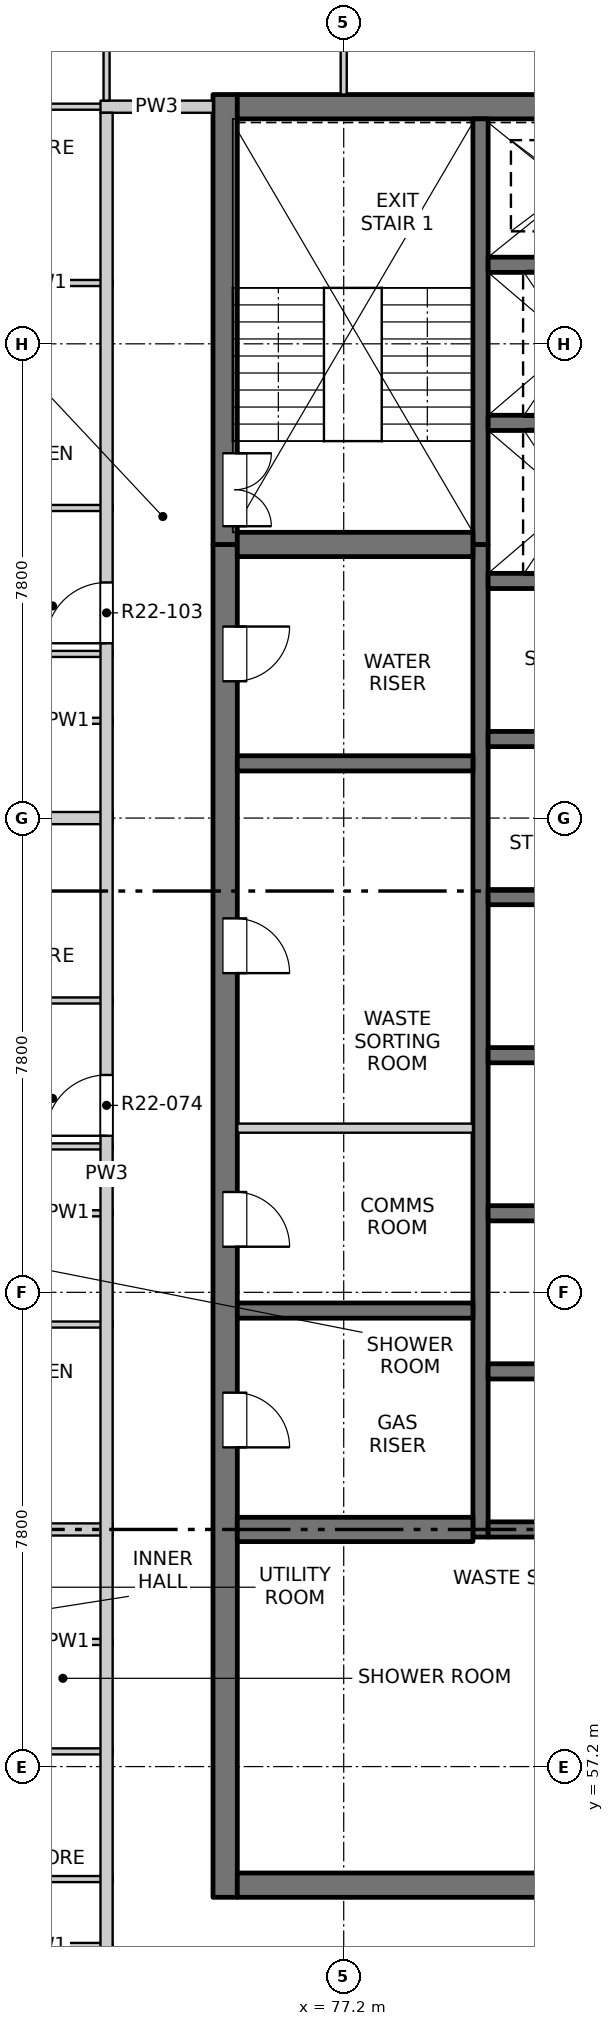
"""IFC4 building model, lengths in metres.
Left out: names, types, materials, properties, quantities, classifications, styles, units other than length and angle.
Written with IfcOpenShell. Run it as: python <this file> out.ifc"""

import sys

from ifc_helpers import new_model, si_unit, direction, frame, frame_2d, origin, place, context, subcontext, project, spatial, rectangle, extrude, element, fill, save


model = new_model("IFC4")
c1 = context("Model", 3, precision=1e-05, world=origin(), true_north=direction((0.0, 1.0)))
c2 = subcontext(c1, "Body", "Model", "MODEL_VIEW")
j1 = project(units=[si_unit("LENGTHUNIT", "METRE"), si_unit("PLANEANGLEUNIT", "RADIAN")], contexts=[c1])
p1 = place(None, origin())
s1 = spatial("IfcSite", under=j1, at=p1, CompositionType="ELEMENT")
p2 = place(p1, origin())
s2 = spatial("IfcBuilding", under=s1, at=p2, CompositionType="ELEMENT")
p3 = place(p2, frame((0.0, 0.0, 231.3)))
s3 = spatial("IfcBuildingStorey", under=s2, at=p3, CompositionType="ELEMENT", Elevation=231.3)
p4 = place(p3, frame((75.25, 55.05, -0.25), z_axis=(0.0, 0.0, 1.0), x_axis=(0.0, 1.0, 0.0)))
e1 = element("IfcWall", 1, at=p4, inside=s3, PredefinedType="SOLIDWALL", context=c2, shape_type="SweptSolid", body=[
    extrude(rectangle(XDim=22.25, YDim=0.4, at=frame_2d((11.125, 0.0))), origin(), (0.0, 0.0, 1.0), 3.4),
])
p5 = place(p4, frame((7.4, 0.0, 0.25)))
e2 = element("IfcOpeningElement", 2, at=p5, cuts=e1, PredefinedType="OPENING", context=c2, shape_type="SweptSolid", body=[
    extrude(rectangle(XDim=0.9, YDim=2.1, at=frame_2d((0.45, 1.05))), frame((0.0, 0.21, 0.0), z_axis=(0.0, -1.0, 0.0), x_axis=(1.0, 0.0, 0.0)), (0.0, 0.0, 1.0), 0.42),
])
p6 = place(p4, frame((10.7, 0.0, 0.25)))
e3 = element("IfcOpeningElement", 3, at=p6, cuts=e1, PredefinedType="OPENING", context=c2, shape_type="SweptSolid", body=[
    extrude(rectangle(XDim=0.9, YDim=2.1, at=frame_2d((0.45, 1.05))), frame((0.0, 0.21, 0.0), z_axis=(0.0, -1.0, 0.0), x_axis=(1.0, 0.0, 0.0)), (0.0, 0.0, 1.0), 0.42),
])
p7 = place(p4, frame((15.2, 0.0, 0.25)))
e4 = element("IfcOpeningElement", 4, at=p7, cuts=e1, PredefinedType="OPENING", context=c2, shape_type="SweptSolid", body=[
    extrude(rectangle(XDim=0.9, YDim=2.1, at=frame_2d((0.45, 1.05))), frame((0.0, 0.21, 0.0), z_axis=(0.0, -1.0, 0.0), x_axis=(1.0, 0.0, 0.0)), (0.0, 0.0, 1.0), 0.42),
])
p8 = place(p4, frame((20.0, 0.0, 0.25)))
e5 = element("IfcOpeningElement", 5, at=p8, cuts=e1, PredefinedType="OPENING", context=c2, shape_type="SweptSolid", body=[
    extrude(rectangle(XDim=0.9, YDim=2.1, at=frame_2d((0.45, 1.05))), frame((0.0, 0.21, 0.0), z_axis=(0.0, -1.0, 0.0), x_axis=(1.0, 0.0, 0.0)), (0.0, 0.0, 1.0), 0.42),
])
p9 = place(p3, frame((75.25, 77.3, -0.25), z_axis=(0.0, 0.0, 1.0), x_axis=(0.0, 1.0, 0.0)))
e6 = element("IfcWall", 6, at=p9, inside=s3, PredefinedType="SOLIDWALL", context=c2, shape_type="SweptSolid", body=[
    extrude(rectangle(XDim=7.4, YDim=0.4, at=frame_2d((3.7, 0.0))), origin(), (0.0, 0.0, 1.0), 3.4),
])
p10 = place(p9, frame((0.3, 0.0, 0.25)))
e7 = element("IfcOpeningElement", 7, at=p10, cuts=e6, PredefinedType="OPENING", context=c2, shape_type="SweptSolid", body=[
    extrude(rectangle(XDim=1.2, YDim=2.1, at=frame_2d((0.6, 1.05))), frame((0.0, 0.21, 0.0), z_axis=(0.0, -1.0, 0.0), x_axis=(1.0, 0.0, 0.0)), (0.0, 0.0, 1.0), 0.42),
])
p11 = place(p3, frame((75.45, 55.25, -0.25), z_axis=(0.0, 0.0, 1.0), x_axis=(1.0, 0.0, 0.0)))
e8 = element("IfcWall", 8, at=p11, inside=s3, PredefinedType="SOLIDWALL", context=c2, shape_type="SweptSolid", body=[
    extrude(rectangle(XDim=19.1, YDim=0.4, at=frame_2d((9.55, 0.0))), origin(), (0.0, 0.0, 1.0), 3.4),
])
p12 = place(p11, frame((8.8, 0.0, 0.25)))
e9 = element("IfcOpeningElement", 9, at=p12, cuts=e8, PredefinedType="OPENING", context=c2, shape_type="SweptSolid", body=[
    extrude(rectangle(XDim=1.5, YDim=2.1, at=frame_2d((0.75, 1.05))), frame((0.0, 0.21, 0.0), z_axis=(0.0, -1.0, 0.0), x_axis=(1.0, 0.0, 0.0)), (0.0, 0.0, 1.0), 0.42),
])
p13 = place(p3, frame((75.45, 84.5, -0.25), z_axis=(0.0, 0.0, 1.0), x_axis=(1.0, 0.0, 0.0)))
e10 = element("IfcWall", 10, at=p13, inside=s3, PredefinedType="SOLIDWALL", context=c2, shape_type="SweptSolid", body=[
    extrude(rectangle(XDim=19.1, YDim=0.4, at=frame_2d((9.55, 0.0))), origin(), (0.0, 0.0, 1.0), 3.4),
])
p14 = place(p3, frame((79.45, 60.975, -0.25), z_axis=(0.0, 0.0, 1.0), x_axis=(0.0, 1.0, 0.0)))
e11 = element("IfcWall", 11, at=p14, inside=s3, PredefinedType="SOLIDWALL", context=c2, shape_type="SweptSolid", body=[
    extrude(rectangle(XDim=16.325, YDim=0.25, at=frame_2d((8.163, 0.0))), origin(), (0.0, 0.0, 1.0), 3.4),
])
p15 = place(p3, frame((79.45, 77.3, -0.25), z_axis=(0.0, 0.0, 1.0), x_axis=(0.0, 1.0, 0.0)))
e12 = element("IfcWall", 12, at=p15, inside=s3, PredefinedType="SOLIDWALL", context=c2, shape_type="SweptSolid", body=[
    extrude(rectangle(XDim=7.0, YDim=0.25, at=frame_2d((3.5, 0.0))), origin(), (0.0, 0.0, 1.0), 3.4),
])
for number, where, z_axis, x_axis in (
    (13, (79.575, 61.1, -0.25), (0.0, 0.0, 1.0), (1.0, 0.0, 0.0)),
    (14, (79.575, 63.7, -0.25), (0.0, 0.0, 1.0), (1.0, 0.0, 0.0)),
    (15, (79.575, 66.3, -0.25), (0.0, 0.0, 1.0), (1.0, 0.0, 0.0)),
    (16, (79.575, 68.9, -0.25), (0.0, 0.0, 1.0), (1.0, 0.0, 0.0)),
    (17, (79.575, 71.5, -0.25), (0.0, 0.0, 1.0), (1.0, 0.0, 0.0)),
    (18, (79.575, 74.1, -0.25), (0.0, 0.0, 1.0), (1.0, 0.0, 0.0)),
    (19, (79.575, 76.7, -0.25), (0.0, 0.0, 1.0), (1.0, 0.0, 0.0)),
    (20, (79.575, 79.3, -0.25), (0.0, 0.0, 1.0), (1.0, 0.0, 0.0)),
    (21, (79.575, 81.9, -0.25), (0.0, 0.0, 1.0), (1.0, 0.0, 0.0)),
):
    element("IfcWall", number, at=place(p3, frame(where, z_axis=z_axis, x_axis=x_axis)), inside=s3, PredefinedType="SOLIDWALL", context=c2, shape_type="SweptSolid", body=[
        extrude(rectangle(XDim=3.0, YDim=0.25, at=frame_2d((1.5, 0.0))), origin(), (0.0, 0.0, 1.0), 3.4),
    ])
p16 = place(p3, frame((75.45, 61.1, -0.25), z_axis=(0.0, 0.0, 1.0), x_axis=(1.0, 0.0, 0.0)))
e22 = element("IfcWall", 22, at=p16, inside=s3, PredefinedType="SOLIDWALL", context=c2, shape_type="SweptSolid", body=[
    extrude(rectangle(XDim=3.875, YDim=0.4, at=frame_2d((1.938, 0.0))), origin(), (0.0, 0.0, 1.0), 3.4),
])
for number, where, z_axis, x_axis in (
    (23, (75.45, 64.7, -0.25), (0.0, 0.0, 1.0), (1.0, 0.0, 0.0)),
    (24, (75.45, 73.7, -0.25), (0.0, 0.0, 1.0), (1.0, 0.0, 0.0)),
):
    element("IfcWall", number, at=place(p3, frame(where, z_axis=z_axis, x_axis=x_axis)), inside=s3, PredefinedType="SOLIDWALL", context=c2, shape_type="SweptSolid", body=[
        extrude(rectangle(XDim=3.875, YDim=0.25, at=frame_2d((1.938, 0.0))), origin(), (0.0, 0.0, 1.0), 3.4),
    ])
p17 = place(p3, frame((75.45, 77.3, -0.25), z_axis=(0.0, 0.0, 1.0), x_axis=(1.0, 0.0, 0.0)))
e25 = element("IfcWall", 25, at=p17, inside=s3, PredefinedType="SOLIDWALL", context=c2, shape_type="SweptSolid", body=[
    extrude(rectangle(XDim=3.875, YDim=0.4, at=frame_2d((1.938, 0.0))), origin(), (0.0, 0.0, 1.0), 3.4),
])
for number, where, z_axis, x_axis in (
    (26, (71.18, 54.25, 0.0), (0.0, 0.0, 1.0), (1.0, 0.0, 0.0)),
    (27, (71.18, 55.35, 0.0), (0.0, 0.0, 1.0), (1.0, 0.0, 0.0)),
    (28, (71.18, 57.45, 0.0), (0.0, 0.0, 1.0), (1.0, 0.0, 0.0)),
    (29, (71.18, 59.25, 0.0), (0.0, 0.0, 1.0), (1.0, 0.0, 0.0)),
):
    element("IfcWall", number, at=place(p3, frame(where, z_axis=z_axis, x_axis=x_axis)), inside=s3, PredefinedType="PARTITIONING", context=c2, shape_type="SweptSolid", body=[
        extrude(rectangle(XDim=2.22, YDim=0.1, at=frame_2d((1.11, 0.0))), origin(), (0.0, 0.0, 1.0), 3.15),
    ])
p18 = place(p3, frame((61.9, 61.1, 0.0), z_axis=(0.0, 0.0, 1.0), x_axis=(1.0, 0.0, 0.0)))
e30 = element("IfcWall", 30, at=p18, inside=s3, PredefinedType="PARTITIONING", context=c2, shape_type="SweptSolid", body=[
    extrude(rectangle(XDim=11.5, YDim=0.2, at=frame_2d((5.75, 0.0))), origin(), (0.0, 0.0, 1.0), 2.55),
])
for number, where, z_axis, x_axis in (
    (31, (71.18, 64.47, 0.0), (0.0, 0.0, 1.0), (1.0, 0.0, 0.0)),
    (32, (71.18, 66.3, 0.0), (0.0, 0.0, 1.0), (1.0, 0.0, 0.0)),
    (33, (71.18, 67.4, 0.0), (0.0, 0.0, 1.0), (1.0, 0.0, 0.0)),
):
    element("IfcWall", number, at=place(p3, frame(where, z_axis=z_axis, x_axis=x_axis)), inside=s3, PredefinedType="PARTITIONING", context=c2, shape_type="SweptSolid", body=[
        extrude(rectangle(XDim=2.22, YDim=0.1, at=frame_2d((1.11, 0.0))), origin(), (0.0, 0.0, 1.0), 3.15),
    ])
p19 = place(p3, frame((75.45, 67.7, 0.0), z_axis=(0.0, 0.0, 1.0), x_axis=(1.0, 0.0, 0.0)))
e34 = element("IfcWall", 34, at=p19, inside=s3, PredefinedType="PARTITIONING", context=c2, shape_type="SweptSolid", body=[
    extrude(rectangle(XDim=3.875, YDim=0.15, at=frame_2d((1.938, 0.0))), origin(), (0.0, 0.0, 1.0), 3.15),
])
p20 = place(p3, frame((71.18, 69.8, 0.0), z_axis=(0.0, 0.0, 1.0), x_axis=(1.0, 0.0, 0.0)))
e35 = element("IfcWall", 35, at=p20, inside=s3, PredefinedType="PARTITIONING", context=c2, shape_type="SweptSolid", body=[
    extrude(rectangle(XDim=2.22, YDim=0.1, at=frame_2d((1.11, 0.0))), origin(), (0.0, 0.0, 1.0), 3.15),
])
p21 = place(p3, frame((61.9, 72.8, 0.0), z_axis=(0.0, 0.0, 1.0), x_axis=(1.0, 0.0, 0.0)))
e36 = element("IfcWall", 36, at=p21, inside=s3, PredefinedType="PARTITIONING", context=c2, shape_type="SweptSolid", body=[
    extrude(rectangle(XDim=11.5, YDim=0.2, at=frame_2d((5.75, 0.0))), origin(), (0.0, 0.0, 1.0), 3.15),
])
for number, where, z_axis, x_axis in (
    (37, (71.18, 74.4, 0.0), (0.0, 0.0, 1.0), (1.0, 0.0, 0.0)),
    (38, (71.18, 75.5, 0.0), (0.0, 0.0, 1.0), (1.0, 0.0, 0.0)),
    (39, (71.18, 77.9, 0.0), (0.0, 0.0, 1.0), (1.0, 0.0, 0.0)),
    (40, (71.18, 81.6, 0.0), (0.0, 0.0, 1.0), (1.0, 0.0, 0.0)),
):
    element("IfcWall", number, at=place(p3, frame(where, z_axis=z_axis, x_axis=x_axis)), inside=s3, PredefinedType="PARTITIONING", context=c2, shape_type="SweptSolid", body=[
        extrude(rectangle(XDim=2.22, YDim=0.1, at=frame_2d((1.11, 0.0))), origin(), (0.0, 0.0, 1.0), 3.15),
    ])
p22 = place(p3, frame((61.9, 84.5, 0.0), z_axis=(0.0, 0.0, 1.0), x_axis=(1.0, 0.0, 0.0)))
e41 = element("IfcWall", 41, at=p22, inside=s3, PredefinedType="PARTITIONING", context=c2, shape_type="SweptSolid", body=[
    extrude(rectangle(XDim=11.5, YDim=0.1, at=frame_2d((5.75, 0.0))), origin(), (0.0, 0.0, 1.0), 3.15),
])
p23 = place(p22, frame((7.965, 0.0, 0.0)))
e42 = element("IfcOpeningElement", 42, at=p23, cuts=e41, PredefinedType="OPENING", context=c2, shape_type="SweptSolid", body=[
    extrude(rectangle(XDim=0.9, YDim=2.1, at=frame_2d((0.45, 1.05))), frame((0.0, 0.06, 0.0), z_axis=(0.0, -1.0, 0.0), x_axis=(1.0, 0.0, 0.0)), (0.0, 0.0, 1.0), 0.12),
])
p24 = place(p3, frame((73.2, 84.5, 0.0), z_axis=(0.0, 0.0, 1.0), x_axis=(1.0, 0.0, 0.0)))
e43 = element("IfcWall", 43, at=p24, inside=s3, PredefinedType="PARTITIONING", context=c2, shape_type="SweptSolid", body=[
    extrude(rectangle(XDim=1.85, YDim=0.2, at=frame_2d((0.925, 0.0))), origin(), (0.0, 0.0, 1.0), 3.15),
])
p25 = place(p3, frame((73.3, 49.5, 0.0), z_axis=(0.0, 0.0, 1.0), x_axis=(0.0, 1.0, 0.0)))
e44 = element("IfcWall", 44, at=p25, inside=s3, PredefinedType="PARTITIONING", context=c2, shape_type="SweptSolid", body=[
    extrude(rectangle(XDim=34.9, YDim=0.2, at=frame_2d((17.45, 0.0))), origin(), (0.0, 0.0, 1.0), 3.15),
])
p26 = place(p25, frame((3.575, 0.0, 0.0)))
e45 = element("IfcOpeningElement", 45, at=p26, cuts=e44, PredefinedType="OPENING", context=c2, shape_type="SweptSolid", body=[
    extrude(rectangle(XDim=1.0, YDim=2.1, at=frame_2d((0.5, 1.05))), frame((0.0, 0.11, 0.0), z_axis=(0.0, -1.0, 0.0), x_axis=(1.0, 0.0, 0.0)), (0.0, 0.0, 1.0), 0.22),
])
p27 = place(p25, frame((18.075, 0.0, 0.0)))
e46 = element("IfcOpeningElement", 46, at=p27, cuts=e44, PredefinedType="OPENING", context=c2, shape_type="SweptSolid", body=[
    extrude(rectangle(XDim=1.0, YDim=2.1, at=frame_2d((0.5, 1.05))), frame((0.0, 0.11, 0.0), z_axis=(0.0, -1.0, 0.0), x_axis=(1.0, 0.0, 0.0)), (0.0, 0.0, 1.0), 0.22),
])
p28 = place(p25, frame((26.175, 0.0, 0.0)))
e47 = element("IfcOpeningElement", 47, at=p28, cuts=e44, PredefinedType="OPENING", context=c2, shape_type="SweptSolid", body=[
    extrude(rectangle(XDim=1.0, YDim=2.1, at=frame_2d((0.5, 1.05))), frame((0.0, 0.11, 0.0), z_axis=(0.0, -1.0, 0.0), x_axis=(1.0, 0.0, 0.0)), (0.0, 0.0, 1.0), 0.22),
])
p29 = place(p3, frame((73.3, 84.6, 0.0), z_axis=(0.0, 0.0, 1.0), x_axis=(0.0, 1.0, 0.0)))
e48 = element("IfcWall", 48, at=p29, inside=s3, PredefinedType="PARTITIONING", context=c2, shape_type="SweptSolid", body=[
    extrude(rectangle(XDim=3.5, YDim=0.1, at=frame_2d((1.75, 0.0))), origin(), (0.0, 0.0, 1.0), 3.15),
])
p30 = place(p29, frame((1.4, 0.0, 0.0)))
e49 = element("IfcOpeningElement", 49, at=p30, cuts=e48, PredefinedType="OPENING", context=c2, shape_type="SweptSolid", body=[
    extrude(rectangle(XDim=0.9, YDim=2.1, at=frame_2d((0.45, 1.05))), frame((0.0, 0.06, 0.0), z_axis=(0.0, -1.0, 0.0), x_axis=(1.0, 0.0, 0.0)), (0.0, 0.0, 1.0), 0.12),
])
p31 = place(p3, frame((77.2, 84.7, 0.0), z_axis=(0.0, 0.0, 1.0), x_axis=(0.0, 1.0, 0.0)))
e50 = element("IfcWall", 50, at=p31, inside=s3, PredefinedType="PARTITIONING", context=c2, shape_type="SweptSolid", body=[
    extrude(rectangle(XDim=3.4, YDim=0.1, at=frame_2d((1.7, 0.0))), origin(), (0.0, 0.0, 1.0), 3.15),
])
p32 = place(p31, frame((1.3, 0.0, 0.0)))
e51 = element("IfcOpeningElement", 51, at=p32, cuts=e50, PredefinedType="OPENING", context=c2, shape_type="SweptSolid", body=[
    extrude(rectangle(XDim=0.9, YDim=2.1, at=frame_2d((0.45, 1.05))), frame((0.0, 0.06, 0.0), z_axis=(0.0, -1.0, 0.0), x_axis=(1.0, 0.0, 0.0)), (0.0, 0.0, 1.0), 0.12),
])
p33 = place(p5, origin())
e52 = element("IfcDoor", 52, at=p33, inside=s3, OperationType="SINGLE_SWING_RIGHT", PredefinedType="DOOR", context=c2, shape_type="SweptSolid", body=[
    extrude(rectangle(XDim=0.9, YDim=2.1, at=frame_2d((0.45, 1.05))), frame((0.0, -0.135, 0.0), z_axis=(0.0, -1.0, 0.0), x_axis=(1.0, 0.0, 0.0)), (0.0, 0.0, 1.0), 0.05),
])
fill(e2, e52)
p34 = place(p6, origin())
e53 = element("IfcDoor", 53, at=p34, inside=s3, OperationType="SINGLE_SWING_RIGHT", PredefinedType="DOOR", context=c2, shape_type="SweptSolid", body=[
    extrude(rectangle(XDim=0.9, YDim=2.1, at=frame_2d((0.45, 1.05))), frame((0.0, -0.135, 0.0), z_axis=(0.0, -1.0, 0.0), x_axis=(1.0, 0.0, 0.0)), (0.0, 0.0, 1.0), 0.05),
])
fill(e3, e53)
p35 = place(p27, origin())
e54 = element("IfcDoor", 54, at=p35, inside=s3, OperationType="SINGLE_SWING_RIGHT", PredefinedType="DOOR", context=c2, shape_type="SweptSolid", body=[
    extrude(rectangle(XDim=1.0, YDim=2.1, at=frame_2d((0.5, 1.05))), frame((0.0, 0.025, 0.0), z_axis=(0.0, -1.0, 0.0), x_axis=(1.0, 0.0, 0.0)), (0.0, 0.0, 1.0), 0.05),
])
fill(e46, e54)
p36 = place(p7, origin())
e55 = element("IfcDoor", 55, at=p36, inside=s3, OperationType="SINGLE_SWING_RIGHT", PredefinedType="DOOR", context=c2, shape_type="SweptSolid", body=[
    extrude(rectangle(XDim=0.9, YDim=2.1, at=frame_2d((0.45, 1.05))), frame((0.0, -0.135, 0.0), z_axis=(0.0, -1.0, 0.0), x_axis=(1.0, 0.0, 0.0)), (0.0, 0.0, 1.0), 0.05),
])
fill(e4, e55)
p37 = place(p8, origin())
e56 = element("IfcDoor", 56, at=p37, inside=s3, OperationType="SINGLE_SWING_LEFT", PredefinedType="DOOR", context=c2, shape_type="SweptSolid", body=[
    extrude(rectangle(XDim=0.9, YDim=2.1, at=frame_2d((0.45, 1.05))), frame((0.0, -0.135, 0.0), z_axis=(0.0, -1.0, 0.0), x_axis=(1.0, 0.0, 0.0)), (0.0, 0.0, 1.0), 0.05),
])
fill(e5, e56)
p38 = place(p28, origin())
e57 = element("IfcDoor", 57, at=p38, inside=s3, OperationType="SINGLE_SWING_RIGHT", PredefinedType="DOOR", context=c2, shape_type="SweptSolid", body=[
    extrude(rectangle(XDim=1.0, YDim=2.1, at=frame_2d((0.5, 1.05))), frame((0.0, 0.025, 0.0), z_axis=(0.0, -1.0, 0.0), x_axis=(1.0, 0.0, 0.0)), (0.0, 0.0, 1.0), 0.05),
])
fill(e47, e57)
p39 = place(p10, origin())
e58 = element("IfcDoor", 58, at=p39, inside=s3, OperationType="DOUBLE_DOOR_SINGLE_SWING", PredefinedType="DOOR", context=c2, shape_type="SweptSolid", body=[
    extrude(rectangle(XDim=1.2, YDim=2.1, at=frame_2d((0.6, 1.05))), frame((0.0, -0.135, 0.0), z_axis=(0.0, -1.0, 0.0), x_axis=(1.0, 0.0, 0.0)), (0.0, 0.0, 1.0), 0.05),
])
fill(e7, e58)
save(model, sys.argv[1])
